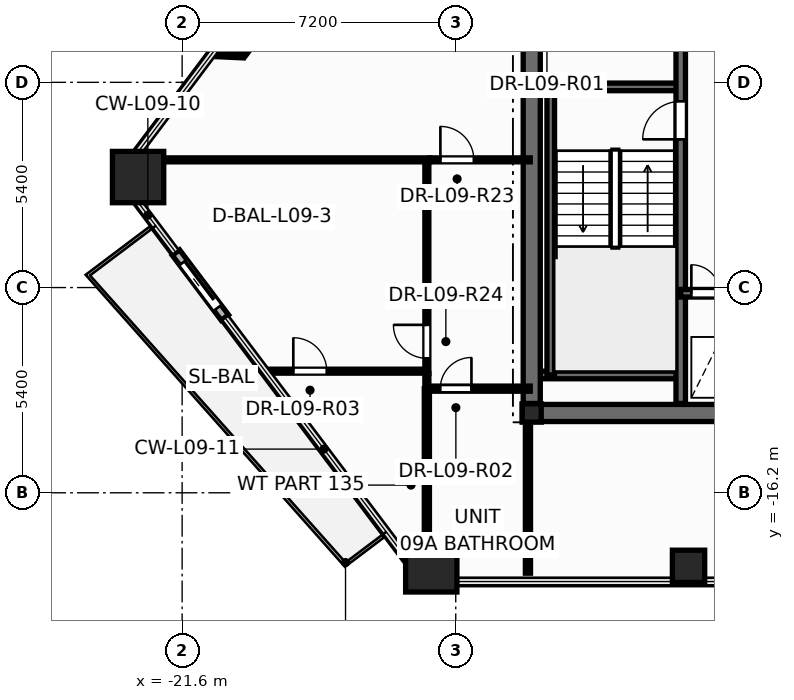
"""IFC4 building model, lengths in metres.
Left out: names, types, materials, properties, quantities, classifications, styles, units other than length and angle.
Written with IfcOpenShell. Run it as: python <this file> out.ifc"""

import sys

from ifc_helpers import new_model, si_unit, direction, frame, frame_2d, origin, origin_2d, place, context, subcontext, project, spatial, rectangle, hollow_rectangle, hollow_circle, i_section, extrude, element, fill, save


model = new_model("IFC4")
c1 = context("Model", 3, precision=1e-05, world=origin(), true_north=direction((0.0, 1.0)))
c2 = subcontext(c1, "Body", "Model", "MODEL_VIEW")
j1 = project(units=[si_unit("LENGTHUNIT", "METRE"), si_unit("PLANEANGLEUNIT", "RADIAN")], contexts=[c1])
p1 = place(None, origin())
s1 = spatial("IfcSite", under=j1, at=p1, CompositionType="ELEMENT")
p2 = place(p1, origin())
s2 = spatial("IfcBuilding", under=s1, at=p2, CompositionType="ELEMENT")
p3 = place(p2, frame((0.0, 0.0, 38.7)))
s3 = spatial("IfcBuildingStorey", under=s2, at=p3, CompositionType="ELEMENT", Elevation=38.7)
for number, where, z_axis, x_axis in (
    (1, (-22.759, -7.892, 0.0), (0.0, 0.0, 1.0), (1.0, 0.0, 0.0)),
    (2, (-15.044, -18.135, 0.0), (0.0, 0.0, 1.0), (1.0, 0.0, 0.0)),
):
    element("IfcColumn", number, at=place(p3, frame(where, z_axis=z_axis, x_axis=x_axis)), inside=s3, PredefinedType="COLUMN", context=c2, shape_type="SweptSolid", body=[
        extrude(hollow_rectangle(XDim=1.35, YDim=1.35, WallThickness=0.065, at=origin_2d()), origin(), (0.0, 0.0, 1.0), 3.6),
    ])
p4 = place(p3, frame((-8.274, -18.135, 0.0), z_axis=(0.0, 0.0, 1.0), x_axis=(1.0, 0.0, 0.0)))
e3 = element("IfcColumn", 3, at=p4, inside=s3, PredefinedType="COLUMN", context=c2, shape_type="SweptSolid", body=[
    extrude(hollow_circle(Radius=0.425, WallThickness=0.038, at=origin_2d()), origin(), (0.0, 0.0, 1.0), 3.6),
])
p5 = place(p3, frame((-12.4, -14.1, 0.0), z_axis=(0.0, 0.0, 1.0), x_axis=(1.0, 0.0, 0.0)))
e4 = element("IfcColumn", 4, at=p5, inside=s3, PredefinedType="COLUMN", context=c2, shape_type="SweptSolid", body=[
    extrude(i_section(OverallWidth=0.5, OverallDepth=0.482, WebThickness=0.04, FlangeThickness=0.045, at=origin_2d()), origin(), (0.0, 0.0, 1.0), 3.6),
])
p6 = place(p3, frame((-21.763, -9.88, -0.015), z_axis=(0.0, 0.0, 1.0), x_axis=(0.601568650406, -0.79882110566, 0.0)))
e5 = element("IfcWall", 5, at=p6, inside=s3, PredefinedType="STANDARD", context=c2, shape_type="SweptSolid", body=[
    extrude(rectangle(XDim=2.14, YDim=0.24, at=frame_2d((1.07, 0.0))), origin(), (0.0, 0.0, 1.0), 2.728),
])
p7 = place(p6, frame((0.32, 0.0, 0.015)))
e6 = element("IfcOpeningElement", 6, at=p7, cuts=e5, PredefinedType="OPENING", context=c2, shape_type="SweptSolid", body=[
    extrude(rectangle(XDim=1.506, YDim=2.204, at=frame_2d((0.75, 1.102))), frame((0.0, 0.13, 0.0), z_axis=(0.0, -1.0, 0.0), x_axis=(1.0, 0.0, 0.0)), (0.0, 0.0, 1.0), 0.26),
])
p8 = place(p3, frame((-12.65, -14.1, 0.0), z_axis=(0.0, 0.0, 1.0), x_axis=(1.0, 0.0, 0.0)))
e7 = element("IfcWall", 7, at=p8, inside=s3, PredefinedType="SHEAR", context=c2, shape_type="SweptSolid", body=[
    extrude(rectangle(XDim=25.3, YDim=0.45, at=frame_2d((12.65, 0.0))), origin(), (0.0, 0.0, 1.0), 3.6),
])
for number, where, z_axis, x_axis in (
    (8, (-12.35, -5.52, 0.0), (0.0, 0.0, 1.0), (1.0, 0.0, 0.0)),
    (9, (-12.35, -13.1, 0.0), (0.0, 0.0, 1.0), (1.0, 0.0, 0.0)),
):
    element("IfcWall", number, at=place(p3, frame(where, z_axis=z_axis, x_axis=x_axis)), inside=s3, PredefinedType="SOLIDWALL", context=c2, shape_type="SweptSolid", body=[
        extrude(rectangle(XDim=3.87, YDim=0.2, at=frame_2d((1.935, 0.0))), origin(), (0.0, 0.0, 1.0), 3.6),
    ])
p9 = place(p3, frame((-11.9, -13.1, 0.0), z_axis=(0.0, 0.0, 1.0), x_axis=(0.0, 1.0, 0.0)))
e10 = element("IfcWall", 10, at=p9, inside=s3, PredefinedType="SOLIDWALL", context=c2, shape_type="SweptSolid", body=[
    extrude(rectangle(XDim=7.58, YDim=0.2, at=frame_2d((3.79, 0.0))), origin(), (0.0, 0.0, 1.0), 3.6),
])
p10 = place(p3, frame((-8.48, -13.85, 0.0), z_axis=(0.0, 0.0, 1.0), x_axis=(0.0, 1.0, 0.0)))
e11 = element("IfcWall", 11, at=p10, inside=s3, PredefinedType="SHEAR", context=c2, shape_type="SweptSolid", body=[
    extrude(rectangle(XDim=9.4, YDim=0.25, at=frame_2d((4.7, 0.0))), origin(), (0.0, 0.0, 1.0), 3.6),
])
p11 = place(p10, frame((6.95, 0.0, 0.0)))
e12 = element("IfcOpeningElement", 12, at=p11, cuts=e11, PredefinedType="OPENING", context=c2, shape_type="SweptSolid", body=[
    extrude(rectangle(XDim=1.006, YDim=2.104, at=frame_2d((0.5, 1.052))), frame((0.0, 0.135, 0.0), z_axis=(0.0, -1.0, 0.0), x_axis=(1.0, 0.0, 0.0)), (0.0, 0.0, 1.0), 0.27),
])
p12 = place(p3, frame((-8.48, -10.95, 0.0), z_axis=(0.0, 0.0, 1.0), x_axis=(1.0, 0.0, 0.0)))
e13 = element("IfcWall", 13, at=p12, inside=s3, PredefinedType="SOLIDWALL", context=c2, shape_type="SweptSolid", body=[
    extrude(rectangle(XDim=3.36, YDim=0.2, at=frame_2d((1.68, 0.0))), origin(), (0.0, 0.0, 1.0), 3.6),
])
p13 = place(p12, frame((0.28, 0.0, 0.0)))
e14 = element("IfcOpeningElement", 14, at=p13, cuts=e13, PredefinedType="OPENING", context=c2, shape_type="SweptSolid", body=[
    extrude(rectangle(XDim=0.756, YDim=2.054, at=frame_2d((0.375, 1.027))), frame((0.0, 0.11, 0.0), z_axis=(0.0, -1.0, 0.0), x_axis=(1.0, 0.0, 0.0)), (0.0, 0.0, 1.0), 0.22),
])
p14 = place(p12, frame((1.85, 0.0, 0.0)))
e15 = element("IfcOpeningElement", 15, at=p14, cuts=e13, PredefinedType="OPENING", context=c2, shape_type="SweptSolid", body=[
    extrude(rectangle(XDim=1.106, YDim=2.104, at=frame_2d((0.55, 1.052))), frame((0.0, 0.11, 0.0), z_axis=(0.0, -1.0, 0.0), x_axis=(1.0, 0.0, 0.0)), (0.0, 0.0, 1.0), 0.22),
])
p15 = place(p3, frame((-12.4, -13.85, 0.0), z_axis=(0.0, 0.0, 1.0), x_axis=(0.0, 1.0, 0.0)))
e16 = element("IfcWall", 16, at=p15, inside=s3, PredefinedType="SHEAR", context=c2, shape_type="SweptSolid", body=[
    extrude(rectangle(XDim=9.4, YDim=0.45, at=frame_2d((4.7, 0.0))), origin(), (0.0, 0.0, 1.0), 3.6),
])
p16 = place(p3, frame((-22.919, -7.44, 0.0), z_axis=(0.0, 0.0, 1.0), x_axis=(1.0, 0.0, 0.0)))
e17 = element("IfcWall", 17, at=p16, inside=s3, PredefinedType="PARTITIONING", context=c2, shape_type="SweptSolid", body=[
    extrude(rectangle(XDim=7.839, YDim=0.105, at=frame_2d((3.919, 0.0))), origin(), (0.0, 0.0, 1.0), 2.325),
])
p17 = place(p3, frame((-15.16, -13.06, 0.0), z_axis=(0.0, 0.0, 1.0), x_axis=(0.0, 1.0, 0.0)))
e18 = element("IfcWall", 18, at=p17, inside=s3, PredefinedType="PARTITIONING", context=c2, shape_type="SweptSolid", body=[
    extrude(rectangle(XDim=5.62, YDim=0.105, at=frame_2d((2.81, 0.0))), origin(), (0.0, 0.0, 1.0), 3.35),
])
p18 = place(p17, frame((0.399, 0.0, 0.0)))
e19 = element("IfcOpeningElement", 19, at=p18, cuts=e18, PredefinedType="OPENING", context=c2, shape_type="SweptSolid", body=[
    extrude(rectangle(XDim=0.886, YDim=2.104, at=frame_2d((0.44, 1.052))), frame((0.0, 0.062, 0.0), z_axis=(0.0, -1.0, 0.0), x_axis=(1.0, 0.0, 0.0)), (0.0, 0.0, 1.0), 0.125),
])
p19 = place(p3, frame((-15.16, -18.536, 0.0), z_axis=(0.0, 0.0, 1.0), x_axis=(0.0, 1.0, 0.0)))
e20 = element("IfcWall", 20, at=p19, inside=s3, PredefinedType="PARTITIONING", context=c2, shape_type="SweptSolid", body=[
    extrude(rectangle(XDim=5.076, YDim=0.135, at=frame_2d((2.538, 0.0))), origin(), (0.0, 0.0, 1.0), 2.713),
])
p20 = place(p3, frame((-19.413, -13.0, 0.0), z_axis=(0.0, 0.0, 1.0), x_axis=(1.0, 0.0, 0.0)))
e21 = element("IfcWall", 21, at=p20, inside=s3, PredefinedType="PARTITIONING", context=c2, shape_type="SweptSolid", body=[
    extrude(rectangle(XDim=4.253, YDim=0.105, at=frame_2d((2.126, 0.0))), origin(), (0.0, 0.0, 1.0), 2.713),
])
p21 = place(p20, frame((0.739, 0.0, 0.0)))
e22 = element("IfcOpeningElement", 22, at=p21, cuts=e21, PredefinedType="OPENING", context=c2, shape_type="SweptSolid", body=[
    extrude(rectangle(XDim=0.886, YDim=2.104, at=frame_2d((0.44, 1.052))), frame((0.0, 0.062, 0.0), z_axis=(0.0, -1.0, 0.0), x_axis=(1.0, 0.0, 0.0)), (0.0, 0.0, 1.0), 0.125),
])
p22 = place(p3, frame((-15.078, -7.44, 0.0), z_axis=(0.0, 0.0, 1.0), x_axis=(1.0, 0.0, 0.0)))
e23 = element("IfcWall", 23, at=p22, inside=s3, PredefinedType="PARTITIONING", context=c2, shape_type="SweptSolid", body=[
    extrude(rectangle(XDim=2.638, YDim=0.105, at=frame_2d((1.319, 0.0))), origin(), (0.0, 0.0, 1.0), 2.713),
])
p23 = place(p22, frame((0.274, 0.0, 0.0)))
e24 = element("IfcOpeningElement", 24, at=p23, cuts=e23, PredefinedType="OPENING", context=c2, shape_type="SweptSolid", body=[
    extrude(rectangle(XDim=0.886, YDim=2.104, at=frame_2d((0.44, 1.052))), frame((0.0, 0.062, 0.0), z_axis=(0.0, -1.0, 0.0), x_axis=(1.0, 0.0, 0.0)), (0.0, 0.0, 1.0), 0.125),
])
p24 = place(p3, frame((-15.16, -13.46, 0.0), z_axis=(0.0, 0.0, 1.0), x_axis=(1.0, 0.0, 0.0)))
e25 = element("IfcWall", 25, at=p24, inside=s3, PredefinedType="PARTITIONING", context=c2, shape_type="SweptSolid", body=[
    extrude(rectangle(XDim=2.72, YDim=0.135, at=frame_2d((1.36, 0.0))), origin(), (0.0, 0.0, 1.0), 2.713),
])
p25 = place(p24, frame((0.353, 0.0, 0.0)))
e26 = element("IfcOpeningElement", 26, at=p25, cuts=e25, PredefinedType="OPENING", context=c2, shape_type="SweptSolid", body=[
    extrude(rectangle(XDim=0.826, YDim=2.104, at=frame_2d((0.41, 1.052))), frame((0.0, 0.078, 0.0), z_axis=(0.0, -1.0, 0.0), x_axis=(1.0, 0.0, 0.0)), (0.0, 0.0, 1.0), 0.155),
])
p26 = place(p3, frame((-18.669, -2.928, 0.0), z_axis=(0.0, 0.0, 1.0), x_axis=(-0.601727904202, -0.798701151436, 0.0)))
e27 = element("IfcWall", 27, at=p26, inside=s3, PredefinedType="PARTITIONING", context=c2, shape_type="SweptSolid", body=[
    extrude(rectangle(XDim=2.214, YDim=0.12, at=frame_2d((1.107, 0.0))), origin(), (0.0, 0.0, 1.0), 3.35),
])
p27 = place(p3, frame((-20.001, -4.697, 0.0), z_axis=(0.0, 0.0, 1.0), x_axis=(-0.99892592368, 0.046335720556, 0.0)))
e28 = element("IfcWall", 28, at=p27, inside=s3, PredefinedType="PARTITIONING", context=c2, shape_type="SweptSolid", body=[
    extrude(rectangle(XDim=0.812, YDim=0.12, at=frame_2d((0.406, 0.0))), origin(), (0.0, 0.0, 1.0), 2.713),
])
p28 = place(p3, frame((-15.16, -13.46, 0.0), z_axis=(0.0, 0.0, 1.0), x_axis=(0.0, 1.0, 0.0)))
e29 = element("IfcWall", 29, at=p28, inside=s3, PredefinedType="PARTITIONING", context=c2, shape_type="SweptSolid", body=[
    extrude(rectangle(XDim=0.398, YDim=0.105, at=frame_2d((0.199, 0.0))), origin(), (0.0, 0.0, 1.0), 3.35),
])
p29 = place(p3, frame((-12.5, -14.4, 0.0), z_axis=(0.0, 0.0, 1.0), x_axis=(0.0, -1.0, 0.0)))
e30 = element("IfcWall", 30, at=p29, inside=s3, PredefinedType="PARTITIONING", context=c2, shape_type="SweptSolid", body=[
    extrude(rectangle(XDim=3.916, YDim=0.135, at=frame_2d((1.958, 0.0))), origin(), (0.0, 0.0, 1.0), 2.713),
])
p30 = place(p7, origin())
e31 = element("IfcDoor", 31, at=p30, inside=s3, OperationType="SLIDING_TO_RIGHT", PredefinedType="DOOR", context=c2, shape_type="SweptSolid", body=[
    extrude(rectangle(XDim=1.5, YDim=2.2, at=frame_2d((0.75, 1.1))), frame((0.0, 0.025, 0.0), z_axis=(0.0, -1.0, 0.0), x_axis=(1.0, 0.0, 0.0)), (0.0, 0.0, 1.0), 0.05),
])
fill(e6, e31)
p31 = place(p11, origin())
e32 = element("IfcDoor", 32, at=p31, inside=s3, OperationType="SINGLE_SWING_LEFT", PredefinedType="DOOR", context=c2, shape_type="SweptSolid", body=[
    extrude(rectangle(XDim=1.0, YDim=2.1, at=frame_2d((0.5, 1.05))), frame((0.0, 0.025, 0.0), z_axis=(0.0, -1.0, 0.0), x_axis=(1.0, 0.0, 0.0)), (0.0, 0.0, 1.0), 0.05),
])
fill(e12, e32)
p32 = place(p13, origin())
e33 = element("IfcDoor", 33, at=p32, inside=s3, OperationType="SINGLE_SWING_LEFT", PredefinedType="DOOR", context=c2, shape_type="SweptSolid", body=[
    extrude(rectangle(XDim=0.75, YDim=2.05, at=frame_2d((0.375, 1.025))), frame((0.0, 0.025, 0.0), z_axis=(0.0, -1.0, 0.0), x_axis=(1.0, 0.0, 0.0)), (0.0, 0.0, 1.0), 0.05),
])
fill(e14, e33)
p33 = place(p25, origin())
e34 = element("IfcDoor", 34, at=p33, inside=s3, OperationType="SINGLE_SWING_RIGHT", PredefinedType="DOOR", context=c2, shape_type="SweptSolid", body=[
    extrude(rectangle(XDim=0.82, YDim=2.1, at=frame_2d((0.41, 1.05))), frame((0.0, 0.025, 0.0), z_axis=(0.0, -1.0, 0.0), x_axis=(1.0, 0.0, 0.0)), (0.0, 0.0, 1.0), 0.05),
])
fill(e26, e34)
p34 = place(p21, origin())
e35 = element("IfcDoor", 35, at=p34, inside=s3, OperationType="SINGLE_SWING_LEFT", PredefinedType="DOOR", context=c2, shape_type="SweptSolid", body=[
    extrude(rectangle(XDim=0.88, YDim=2.1, at=frame_2d((0.44, 1.05))), frame((0.0, 0.025, 0.0), z_axis=(0.0, -1.0, 0.0), x_axis=(1.0, 0.0, 0.0)), (0.0, 0.0, 1.0), 0.05),
])
fill(e22, e35)
p35 = place(p23, origin())
e36 = element("IfcDoor", 36, at=p35, inside=s3, OperationType="SINGLE_SWING_LEFT", PredefinedType="DOOR", context=c2, shape_type="SweptSolid", body=[
    extrude(rectangle(XDim=0.88, YDim=2.1, at=frame_2d((0.44, 1.05))), frame((0.0, 0.025, 0.0), z_axis=(0.0, -1.0, 0.0), x_axis=(1.0, 0.0, 0.0)), (0.0, 0.0, 1.0), 0.05),
])
fill(e24, e36)
p36 = place(p18, origin())
e37 = element("IfcDoor", 37, at=p36, inside=s3, OperationType="SINGLE_SWING_RIGHT", PredefinedType="DOOR", context=c2, shape_type="SweptSolid", body=[
    extrude(rectangle(XDim=0.88, YDim=2.1, at=frame_2d((0.44, 1.05))), frame((0.0, 0.025, 0.0), z_axis=(0.0, -1.0, 0.0), x_axis=(1.0, 0.0, 0.0)), (0.0, 0.0, 1.0), 0.05),
])
fill(e19, e37)
save(model, sys.argv[1])
